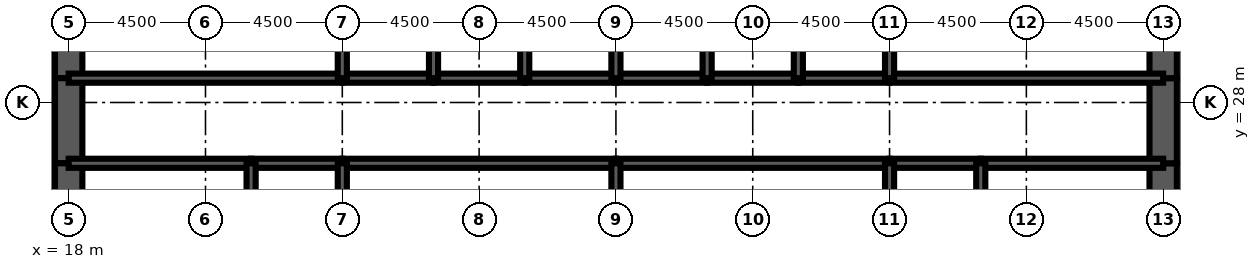
"""IFC4 building model, lengths in metres.
Left out: names, types, materials, properties, quantities, classifications, styles, units other than length and angle.
Written with IfcOpenShell. Run it as: python <this file> out.ifc"""

import sys

from ifc_helpers import new_model, si_unit, direction, frame, frame_2d, origin, place, context, subcontext, project, spatial, rectangle, extrude, element, fill, save


model = new_model("IFC4")
c1 = context("Model", 3, precision=1e-05, world=origin(), true_north=direction((0.0, 1.0)))
c2 = subcontext(c1, "Body", "Model", "MODEL_VIEW")
j1 = project(units=[si_unit("LENGTHUNIT", "METRE"), si_unit("PLANEANGLEUNIT", "RADIAN")], contexts=[c1])
p1 = place(None, origin())
s1 = spatial("IfcSite", under=j1, at=p1, CompositionType="ELEMENT")
p2 = place(p1, origin())
s2 = spatial("IfcBuilding", under=s1, at=p2, CompositionType="ELEMENT")
p3 = place(p2, frame((0.0, 0.0, 23.0)))
s3 = spatial("IfcBuildingStorey", under=s2, at=p3, CompositionType="ELEMENT", Elevation=23.0)
p4 = place(p3, frame((18.0, 32.0, 0.0), z_axis=(0.0, 0.0, 1.0), x_axis=(0.0, -1.0, 0.0)))
e1 = element("IfcWall", 1, at=p4, inside=s3, PredefinedType="SHEAR", context=c2, shape_type="SweptSolid", body=[
    extrude(rectangle(XDim=3.2, YDim=0.9, at=frame_2d((1.6, 0.0))), origin(), (0.0, 0.0, 1.0), 4.5),
])
p5 = place(p3, frame((18.0, 28.8, 0.0), z_axis=(0.0, 0.0, 1.0), x_axis=(0.0, -1.0, 0.0)))
e2 = element("IfcWall", 2, at=p5, inside=s3, PredefinedType="SHEAR", context=c2, shape_type="SweptSolid", body=[
    extrude(rectangle(XDim=2.8, YDim=0.9, at=frame_2d((1.4, 0.0))), origin(), (0.0, 0.0, 1.0), 4.5),
])
p6 = place(p5, frame((0.4, 0.0, 0.0)))
e3 = element("IfcOpeningElement", 3, at=p6, cuts=e2, PredefinedType="OPENING", context=c2, shape_type="SweptSolid", body=[
    extrude(rectangle(XDim=1.8, YDim=2.1, at=frame_2d((0.9, 1.05))), frame((0.0, 0.46, 0.0), z_axis=(0.0, -1.0, 0.0), x_axis=(1.0, 0.0, 0.0)), (0.0, 0.0, 1.0), 0.92),
])
for number, where, z_axis, x_axis in (
    (4, (18.0, 26.0, 0.0), (0.0, 0.0, 1.0), (0.0, -1.0, 0.0)),
    (5, (54.0, 22.0, 0.0), (0.0, 0.0, 1.0), (0.0, 1.0, 0.0)),
):
    element("IfcWall", number, at=place(p3, frame(where, z_axis=z_axis, x_axis=x_axis)), inside=s3, PredefinedType="SHEAR", context=c2, shape_type="SweptSolid", body=[
        extrude(rectangle(XDim=4.0, YDim=0.9, at=frame_2d((2.0, 0.0))), origin(), (0.0, 0.0, 1.0), 4.5),
    ])
p7 = place(p3, frame((54.0, 26.0, 0.0), z_axis=(0.0, 0.0, 1.0), x_axis=(0.0, 1.0, 0.0)))
e6 = element("IfcWall", 6, at=p7, inside=s3, PredefinedType="SHEAR", context=c2, shape_type="SweptSolid", body=[
    extrude(rectangle(XDim=2.8, YDim=0.9, at=frame_2d((1.4, 0.0))), origin(), (0.0, 0.0, 1.0), 4.5),
])
p8 = place(p7, frame((0.6, 0.0, 0.0)))
e7 = element("IfcOpeningElement", 7, at=p8, cuts=e6, PredefinedType="OPENING", context=c2, shape_type="SweptSolid", body=[
    extrude(rectangle(XDim=1.8, YDim=2.1, at=frame_2d((0.9, 1.05))), frame((0.0, 0.46, 0.0), z_axis=(0.0, -1.0, 0.0), x_axis=(1.0, 0.0, 0.0)), (0.0, 0.0, 1.0), 0.92),
])
p9 = place(p3, frame((54.0, 28.8, 0.0), z_axis=(0.0, 0.0, 1.0), x_axis=(0.0, 1.0, 0.0)))
e8 = element("IfcWall", 8, at=p9, inside=s3, PredefinedType="SHEAR", context=c2, shape_type="SweptSolid", body=[
    extrude(rectangle(XDim=3.2, YDim=0.9, at=frame_2d((1.6, 0.0))), origin(), (0.0, 0.0, 1.0), 4.5),
])
p10 = place(p3, frame((18.0, 28.8, 0.0), z_axis=(0.0, 0.0, 1.0), x_axis=(1.0, 0.0, 0.0)))
e9 = element("IfcWall", 9, at=p10, inside=s3, PredefinedType="SOLIDWALL", context=c2, shape_type="SweptSolid", body=[
    extrude(rectangle(XDim=9.0, YDim=0.3, at=frame_2d((4.5, 0.0))), origin(), (0.0, 0.0, 1.0), 4.5),
])
p11 = place(p10, frame((0.65, 0.0, 0.0)))
e10 = element("IfcOpeningElement", 10, at=p11, cuts=e9, PredefinedType="OPENING", context=c2, shape_type="SweptSolid", body=[
    extrude(rectangle(XDim=1.0, YDim=2.1, at=frame_2d((0.5, 1.05))), frame((0.0, 0.16, 0.0), z_axis=(0.0, -1.0, 0.0), x_axis=(1.0, 0.0, 0.0)), (0.0, 0.0, 1.0), 0.32),
])
p12 = place(p3, frame((27.0, 28.8, 0.0), z_axis=(0.0, 0.0, 1.0), x_axis=(1.0, 0.0, 0.0)))
e11 = element("IfcWall", 11, at=p12, inside=s3, PredefinedType="SOLIDWALL", context=c2, shape_type="SweptSolid", body=[
    extrude(rectangle(XDim=3.0, YDim=0.3, at=frame_2d((1.5, 0.0))), origin(), (0.0, 0.0, 1.0), 4.5),
])
p13 = place(p12, frame((0.95, 0.0, 0.0)))
e12 = element("IfcOpeningElement", 12, at=p13, cuts=e11, PredefinedType="OPENING", context=c2, shape_type="SweptSolid", body=[
    extrude(rectangle(XDim=1.1, YDim=2.2, at=frame_2d((0.55, 1.1))), frame((0.0, 0.16, 0.0), z_axis=(0.0, -1.0, 0.0), x_axis=(1.0, 0.0, 0.0)), (0.0, 0.0, 1.0), 0.32),
])
p14 = place(p3, frame((30.0, 28.8, 0.0), z_axis=(0.0, 0.0, 1.0), x_axis=(1.0, 0.0, 0.0)))
e13 = element("IfcWall", 13, at=p14, inside=s3, PredefinedType="SOLIDWALL", context=c2, shape_type="SweptSolid", body=[
    extrude(rectangle(XDim=3.0, YDim=0.3, at=frame_2d((1.5, 0.0))), origin(), (0.0, 0.0, 1.0), 4.5),
])
p15 = place(p14, frame((0.95, 0.0, 0.0)))
e14 = element("IfcOpeningElement", 14, at=p15, cuts=e13, PredefinedType="OPENING", context=c2, shape_type="SweptSolid", body=[
    extrude(rectangle(XDim=1.1, YDim=2.2, at=frame_2d((0.55, 1.1))), frame((0.0, 0.16, 0.0), z_axis=(0.0, -1.0, 0.0), x_axis=(1.0, 0.0, 0.0)), (0.0, 0.0, 1.0), 0.32),
])
p16 = place(p3, frame((33.0, 28.8, 0.0), z_axis=(0.0, 0.0, 1.0), x_axis=(1.0, 0.0, 0.0)))
e15 = element("IfcWall", 15, at=p16, inside=s3, PredefinedType="SOLIDWALL", context=c2, shape_type="SweptSolid", body=[
    extrude(rectangle(XDim=3.0, YDim=0.3, at=frame_2d((1.5, 0.0))), origin(), (0.0, 0.0, 1.0), 4.5),
])
p17 = place(p16, frame((0.95, 0.0, 0.0)))
e16 = element("IfcOpeningElement", 16, at=p17, cuts=e15, PredefinedType="OPENING", context=c2, shape_type="SweptSolid", body=[
    extrude(rectangle(XDim=1.1, YDim=2.2, at=frame_2d((0.55, 1.1))), frame((0.0, 0.16, 0.0), z_axis=(0.0, -1.0, 0.0), x_axis=(1.0, 0.0, 0.0)), (0.0, 0.0, 1.0), 0.32),
])
for number, where, z_axis, x_axis in (
    (17, (36.0, 28.8, 0.0), (0.0, 0.0, 1.0), (1.0, 0.0, 0.0)),
    (18, (39.0, 28.8, 0.0), (0.0, 0.0, 1.0), (1.0, 0.0, 0.0)),
):
    element("IfcWall", number, at=place(p3, frame(where, z_axis=z_axis, x_axis=x_axis)), inside=s3, PredefinedType="SOLIDWALL", context=c2, shape_type="SweptSolid", body=[
        extrude(rectangle(XDim=3.0, YDim=0.3, at=frame_2d((1.5, 0.0))), origin(), (0.0, 0.0, 1.0), 4.5),
    ])
p18 = place(p3, frame((42.0, 28.8, 0.0), z_axis=(0.0, 0.0, 1.0), x_axis=(1.0, 0.0, 0.0)))
e19 = element("IfcWall", 19, at=p18, inside=s3, PredefinedType="SOLIDWALL", context=c2, shape_type="SweptSolid", body=[
    extrude(rectangle(XDim=3.0, YDim=0.3, at=frame_2d((1.5, 0.0))), origin(), (0.0, 0.0, 1.0), 4.5),
])
p19 = place(p18, frame((0.95, 0.0, 0.0)))
e20 = element("IfcOpeningElement", 20, at=p19, cuts=e19, PredefinedType="OPENING", context=c2, shape_type="SweptSolid", body=[
    extrude(rectangle(XDim=1.1, YDim=2.2, at=frame_2d((0.55, 1.1))), frame((0.0, 0.16, 0.0), z_axis=(0.0, -1.0, 0.0), x_axis=(1.0, 0.0, 0.0)), (0.0, 0.0, 1.0), 0.32),
])
p20 = place(p3, frame((45.0, 28.8, 0.0), z_axis=(0.0, 0.0, 1.0), x_axis=(1.0, 0.0, 0.0)))
e21 = element("IfcWall", 21, at=p20, inside=s3, PredefinedType="SOLIDWALL", context=c2, shape_type="SweptSolid", body=[
    extrude(rectangle(XDim=9.0, YDim=0.3, at=frame_2d((4.5, 0.0))), origin(), (0.0, 0.0, 1.0), 4.5),
])
p21 = place(p20, frame((7.35, 0.0, 0.0)))
e22 = element("IfcOpeningElement", 22, at=p21, cuts=e21, PredefinedType="OPENING", context=c2, shape_type="SweptSolid", body=[
    extrude(rectangle(XDim=1.0, YDim=2.1, at=frame_2d((0.5, 1.05))), frame((0.0, 0.16, 0.0), z_axis=(0.0, -1.0, 0.0), x_axis=(1.0, 0.0, 0.0)), (0.0, 0.0, 1.0), 0.32),
])
p22 = place(p3, frame((18.0, 26.0, 0.0), z_axis=(0.0, 0.0, 1.0), x_axis=(1.0, 0.0, 0.0)))
e23 = element("IfcWall", 23, at=p22, inside=s3, PredefinedType="SOLIDWALL", context=c2, shape_type="SweptSolid", body=[
    extrude(rectangle(XDim=6.0, YDim=0.3, at=frame_2d((3.0, 0.0))), origin(), (0.0, 0.0, 1.0), 4.5),
])
p23 = place(p3, frame((24.0, 26.0, 0.0), z_axis=(0.0, 0.0, 1.0), x_axis=(1.0, 0.0, 0.0)))
e24 = element("IfcWall", 24, at=p23, inside=s3, PredefinedType="SOLIDWALL", context=c2, shape_type="SweptSolid", body=[
    extrude(rectangle(XDim=3.0, YDim=0.3, at=frame_2d((1.5, 0.0))), origin(), (0.0, 0.0, 1.0), 4.5),
])
for number, where, z_axis, x_axis in (
    (25, (27.0, 26.0, 0.0), (0.0, 0.0, 1.0), (1.0, 0.0, 0.0)),
    (26, (36.0, 26.0, 0.0), (0.0, 0.0, 1.0), (1.0, 0.0, 0.0)),
):
    element("IfcWall", number, at=place(p3, frame(where, z_axis=z_axis, x_axis=x_axis)), inside=s3, PredefinedType="SOLIDWALL", context=c2, shape_type="SweptSolid", body=[
        extrude(rectangle(XDim=9.0, YDim=0.3, at=frame_2d((4.5, 0.0))), origin(), (0.0, 0.0, 1.0), 4.5),
    ])
p24 = place(p3, frame((45.0, 26.0, 0.0), z_axis=(0.0, 0.0, 1.0), x_axis=(1.0, 0.0, 0.0)))
e27 = element("IfcWall", 27, at=p24, inside=s3, PredefinedType="SOLIDWALL", context=c2, shape_type="SweptSolid", body=[
    extrude(rectangle(XDim=3.0, YDim=0.3, at=frame_2d((1.5, 0.0))), origin(), (0.0, 0.0, 1.0), 4.5),
])
p25 = place(p3, frame((48.0, 26.0, 0.0), z_axis=(0.0, 0.0, 1.0), x_axis=(1.0, 0.0, 0.0)))
e28 = element("IfcWall", 28, at=p25, inside=s3, PredefinedType="SOLIDWALL", context=c2, shape_type="SweptSolid", body=[
    extrude(rectangle(XDim=6.0, YDim=0.3, at=frame_2d((3.0, 0.0))), origin(), (0.0, 0.0, 1.0), 4.5),
])
for number, where, z_axis, x_axis in (
    (29, (27.0, 28.8, 0.0), (0.0, 0.0, 1.0), (0.0, 1.0, 0.0)),
    (30, (30.0, 28.8, 0.0), (0.0, 0.0, 1.0), (0.0, 1.0, 0.0)),
    (31, (33.0, 28.8, 0.0), (0.0, 0.0, 1.0), (0.0, 1.0, 0.0)),
    (32, (36.0, 28.8, 0.0), (0.0, 0.0, 1.0), (0.0, 1.0, 0.0)),
    (33, (39.0, 28.8, 0.0), (0.0, 0.0, 1.0), (0.0, 1.0, 0.0)),
    (34, (42.0, 28.8, 0.0), (0.0, 0.0, 1.0), (0.0, 1.0, 0.0)),
    (35, (45.0, 28.8, 0.0), (0.0, 0.0, 1.0), (0.0, 1.0, 0.0)),
):
    element("IfcWall", number, at=place(p3, frame(where, z_axis=z_axis, x_axis=x_axis)), inside=s3, PredefinedType="SOLIDWALL", context=c2, shape_type="SweptSolid", body=[
        extrude(rectangle(XDim=3.2, YDim=0.3, at=frame_2d((1.6, 0.0))), origin(), (0.0, 0.0, 1.0), 4.5),
    ])
for number, where, z_axis, x_axis in (
    (36, (24.0, 22.0, 0.0), (0.0, 0.0, 1.0), (0.0, 1.0, 0.0)),
    (37, (27.0, 22.0, 0.0), (0.0, 0.0, 1.0), (0.0, 1.0, 0.0)),
    (38, (36.0, 22.0, 0.0), (0.0, 0.0, 1.0), (0.0, 1.0, 0.0)),
    (39, (45.0, 22.0, 0.0), (0.0, 0.0, 1.0), (0.0, 1.0, 0.0)),
    (40, (48.0, 22.0, 0.0), (0.0, 0.0, 1.0), (0.0, 1.0, 0.0)),
):
    element("IfcWall", number, at=place(p3, frame(where, z_axis=z_axis, x_axis=x_axis)), inside=s3, PredefinedType="SOLIDWALL", context=c2, shape_type="SweptSolid", body=[
        extrude(rectangle(XDim=4.0, YDim=0.3, at=frame_2d((2.0, 0.0))), origin(), (0.0, 0.0, 1.0), 4.5),
    ])
p26 = place(p3, frame((38.0, 22.15, 0.0), z_axis=(0.0, 0.0, 1.0), x_axis=(0.0, 1.0, 0.0)))
e41 = element("IfcWall", 41, at=p26, inside=s3, PredefinedType="PARTITIONING", context=c2, shape_type="SweptSolid", body=[
    extrude(rectangle(XDim=3.7, YDim=0.15, at=frame_2d((1.85, 0.0))), origin(), (0.0, 0.0, 1.0), 3.0),
])
p27 = place(p26, frame((2.2, 0.0, 0.0)))
e42 = element("IfcOpeningElement", 42, at=p27, cuts=e41, PredefinedType="OPENING", context=c2, shape_type="SweptSolid", body=[
    extrude(rectangle(XDim=1.0, YDim=2.1, at=frame_2d((0.5, 1.05))), frame((0.0, 0.085, 0.0), z_axis=(0.0, -1.0, 0.0), x_axis=(1.0, 0.0, 0.0)), (0.0, 0.0, 1.0), 0.17),
])
for number, where, z_axis, x_axis in (
    (43, (20.025, 22.15, 0.0), (0.0, 0.0, 1.0), (0.0, 1.0, 0.0)),
    (44, (51.375, 22.15, 0.0), (0.0, 0.0, 1.0), (0.0, 1.0, 0.0)),
):
    element("IfcWall", number, at=place(p3, frame(where, z_axis=z_axis, x_axis=x_axis)), inside=s3, PredefinedType="PARTITIONING", context=c2, shape_type="SweptSolid", body=[
        extrude(rectangle(XDim=3.7, YDim=0.15, at=frame_2d((1.85, 0.0))), origin(), (0.0, 0.0, 1.0), 3.0),
    ])
p28 = place(p27, origin())
e45 = element("IfcDoor", 45, at=p28, inside=s3, OperationType="SINGLE_SWING_RIGHT", PredefinedType="DOOR", context=c2, shape_type="SweptSolid", body=[
    extrude(rectangle(XDim=1.0, YDim=2.1, at=frame_2d((0.5, 1.05))), frame((0.0, 0.025, 0.0), z_axis=(0.0, -1.0, 0.0), x_axis=(1.0, 0.0, 0.0)), (0.0, 0.0, 1.0), 0.05),
])
fill(e42, e45)
p29 = place(p19, origin())
e46 = element("IfcDoor", 46, at=p29, inside=s3, OperationType="DOUBLE_DOOR_SLIDING", PredefinedType="USERDEFINED", context=c2, shape_type="SweptSolid", body=[
    extrude(rectangle(XDim=1.1, YDim=2.2, at=frame_2d((0.55, 1.1))), frame((0.0, 0.025, 0.0), z_axis=(0.0, -1.0, 0.0), x_axis=(1.0, 0.0, 0.0)), (0.0, 0.0, 1.0), 0.05),
])
fill(e20, e46)
p30 = place(p13, origin())
e47 = element("IfcDoor", 47, at=p30, inside=s3, OperationType="DOUBLE_DOOR_SLIDING", PredefinedType="USERDEFINED", context=c2, shape_type="SweptSolid", body=[
    extrude(rectangle(XDim=1.1, YDim=2.2, at=frame_2d((0.55, 1.1))), frame((0.0, 0.025, 0.0), z_axis=(0.0, -1.0, 0.0), x_axis=(1.0, 0.0, 0.0)), (0.0, 0.0, 1.0), 0.05),
])
fill(e12, e47)
p31 = place(p15, origin())
e48 = element("IfcDoor", 48, at=p31, inside=s3, OperationType="DOUBLE_DOOR_SLIDING", PredefinedType="USERDEFINED", context=c2, shape_type="SweptSolid", body=[
    extrude(rectangle(XDim=1.1, YDim=2.2, at=frame_2d((0.55, 1.1))), frame((0.0, 0.025, 0.0), z_axis=(0.0, -1.0, 0.0), x_axis=(1.0, 0.0, 0.0)), (0.0, 0.0, 1.0), 0.05),
])
fill(e14, e48)
p32 = place(p17, origin())
e49 = element("IfcDoor", 49, at=p32, inside=s3, OperationType="DOUBLE_DOOR_SLIDING", PredefinedType="USERDEFINED", context=c2, shape_type="SweptSolid", body=[
    extrude(rectangle(XDim=1.1, YDim=2.2, at=frame_2d((0.55, 1.1))), frame((0.0, 0.025, 0.0), z_axis=(0.0, -1.0, 0.0), x_axis=(1.0, 0.0, 0.0)), (0.0, 0.0, 1.0), 0.05),
])
fill(e16, e49)
p33 = place(p11, origin())
e50 = element("IfcDoor", 50, at=p33, inside=s3, OperationType="SINGLE_SWING_LEFT", PredefinedType="DOOR", context=c2, shape_type="SweptSolid", body=[
    extrude(rectangle(XDim=1.0, YDim=2.1, at=frame_2d((0.5, 1.05))), frame((0.0, 0.025, 0.0), z_axis=(0.0, -1.0, 0.0), x_axis=(1.0, 0.0, 0.0)), (0.0, 0.0, 1.0), 0.05),
])
fill(e10, e50)
p34 = place(p21, origin())
e51 = element("IfcDoor", 51, at=p34, inside=s3, OperationType="SINGLE_SWING_RIGHT", PredefinedType="DOOR", context=c2, shape_type="SweptSolid", body=[
    extrude(rectangle(XDim=1.0, YDim=2.1, at=frame_2d((0.5, 1.05))), frame((0.0, 0.025, 0.0), z_axis=(0.0, -1.0, 0.0), x_axis=(1.0, 0.0, 0.0)), (0.0, 0.0, 1.0), 0.05),
])
fill(e22, e51)
p35 = place(p6, origin())
e52 = element("IfcDoor", 52, at=p35, inside=s3, OperationType="SINGLE_SWING_LEFT", PredefinedType="DOOR", context=c2, shape_type="SweptSolid", body=[
    extrude(rectangle(XDim=1.8, YDim=2.1, at=frame_2d((0.9, 1.05))), frame((0.0, 0.45, 0.0), z_axis=(0.0, -1.0, 0.0), x_axis=(1.0, 0.0, 0.0)), (0.0, 0.0, 1.0), 0.899),
])
fill(e3, e52)
p36 = place(p8, origin())
e53 = element("IfcDoor", 53, at=p36, inside=s3, OperationType="SINGLE_SWING_LEFT", PredefinedType="DOOR", context=c2, shape_type="SweptSolid", body=[
    extrude(rectangle(XDim=1.8, YDim=2.1, at=frame_2d((0.9, 1.05))), frame((0.0, 0.45, 0.0), z_axis=(0.0, -1.0, 0.0), x_axis=(1.0, 0.0, 0.0)), (0.0, 0.0, 1.0), 0.899),
])
fill(e7, e53)
save(model, sys.argv[1])
